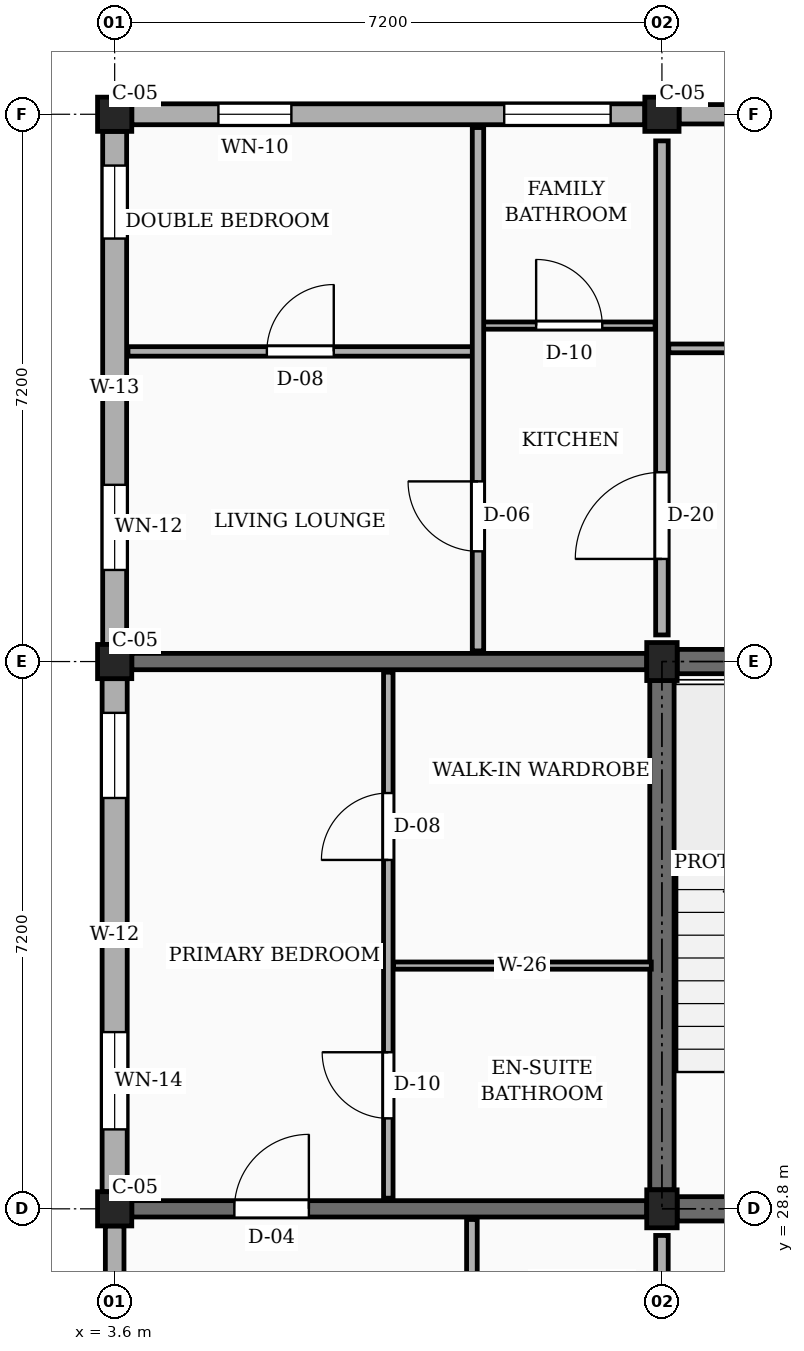
"""IFC4 building model, lengths in metres.
Left out: names, types, materials, properties, quantities, classifications, styles, units other than length and angle.
Written with IfcOpenShell. Run it as: python <this file> out.ifc"""

import sys

from ifc_helpers import new_model, si_unit, direction, frame, frame_2d, origin, origin_2d, place, context, subcontext, project, spatial, rectangle, extrude, element, fill, save


model = new_model("IFC4")
c1 = context("Model", 3, precision=1e-05, world=origin(), true_north=direction((0.0, 1.0)))
c2 = subcontext(c1, "Body", "Model", "MODEL_VIEW")
j1 = project(units=[si_unit("LENGTHUNIT", "METRE"), si_unit("PLANEANGLEUNIT", "RADIAN")], contexts=[c1])
p1 = place(None, origin())
s1 = spatial("IfcSite", under=j1, at=p1, CompositionType="ELEMENT")
p2 = place(p1, origin())
s2 = spatial("IfcBuilding", under=s1, at=p2, CompositionType="ELEMENT")
p3 = place(p2, frame((0.0, 0.0, 36.0)))
s3 = spatial("IfcBuildingStorey", under=s2, at=p3, CompositionType="ELEMENT", Elevation=36.0)
for number, where, z_axis, x_axis in (
    (1, (3.6, 28.8, 0.0), (0.0, 0.0, 1.0), (1.0, 0.0, 0.0)),
    (2, (3.6, 36.0, 0.0), (0.0, 0.0, 1.0), (1.0, 0.0, 0.0)),
    (3, (3.6, 43.2, 0.0), (0.0, 0.0, 1.0), (1.0, 0.0, 0.0)),
):
    element("IfcColumn", number, at=place(p3, frame(where, z_axis=z_axis, x_axis=x_axis)), inside=s3, PredefinedType="COLUMN", context=c2, shape_type="SweptSolid", body=[
        extrude(rectangle(XDim=0.45, YDim=0.45, at=origin_2d()), origin(), (0.0, 0.0, 1.0), 3.15),
    ])
for number, where, z_axis, x_axis in (
    (4, (10.8, 28.8, 0.0), (0.0, 0.0, 1.0), (1.0, 0.0, 0.0)),
    (5, (10.8, 36.0, 0.0), (0.0, 0.0, 1.0), (1.0, 0.0, 0.0)),
):
    element("IfcColumn", number, at=place(p3, frame(where, z_axis=z_axis, x_axis=x_axis)), inside=s3, PredefinedType="COLUMN", context=c2, shape_type="SweptSolid", body=[
        extrude(rectangle(XDim=0.4, YDim=0.5, at=origin_2d()), origin(), (0.0, 0.0, 1.0), 3.15),
    ])
p4 = place(p3, frame((10.8, 43.2, 0.0), z_axis=(0.0, 0.0, 1.0), x_axis=(1.0, 0.0, 0.0)))
e6 = element("IfcColumn", 6, at=p4, inside=s3, PredefinedType="COLUMN", context=c2, shape_type="SweptSolid", body=[
    extrude(rectangle(XDim=0.45, YDim=0.45, at=origin_2d()), origin(), (0.0, 0.0, 1.0), 3.15),
])
p5 = place(p3, frame((3.825, 28.8, 0.0), z_axis=(0.0, 0.0, 1.0), x_axis=(1.0, 0.0, 0.0)))
e7 = element("IfcWall", 7, at=p5, inside=s3, PredefinedType="SOLIDWALL", context=c2, shape_type="SweptSolid", body=[
    extrude(rectangle(XDim=6.775, YDim=0.215, at=frame_2d((3.388, 0.0))), origin(), (0.0, 0.0, 1.0), 2.17),
])
p6 = place(p5, frame((1.35, 0.0, 0.0)))
e8 = element("IfcOpeningElement", 8, at=p6, cuts=e7, PredefinedType="OPENING", context=c2, shape_type="SweptSolid", body=[
    extrude(rectangle(XDim=0.98, YDim=2.12, at=frame_2d((0.49, 1.06))), frame((0.0, 0.118, 0.0), z_axis=(0.0, -1.0, 0.0), x_axis=(1.0, 0.0, 0.0)), (0.0, 0.0, 1.0), 0.235),
])
p7 = place(p3, frame((3.825, 36.0, 0.0), z_axis=(0.0, 0.0, 1.0), x_axis=(1.0, 0.0, 0.0)))
e9 = element("IfcWall", 9, at=p7, inside=s3, PredefinedType="SOLIDWALL", context=c2, shape_type="SweptSolid", body=[
    extrude(rectangle(XDim=6.775, YDim=0.215, at=frame_2d((3.388, 0.0))), origin(), (0.0, 0.0, 1.0), 2.17),
])
p8 = place(p3, frame((17.775, 43.2, 0.0), z_axis=(0.0, 0.0, 1.0), x_axis=(-1.0, 0.0, 0.0)))
e10 = element("IfcWall", 10, at=p8, inside=s3, PredefinedType="SOLIDWALL", context=c2, shape_type="SweptSolid", body=[
    extrude(rectangle(XDim=6.75, YDim=0.255, at=frame_2d((3.375, 0.0))), origin(), (0.0, 0.0, 1.0), 2.44),
])
p9 = place(p8, frame((0.45, 0.0, 0.78)))
e11 = element("IfcOpeningElement", 11, at=p9, cuts=e10, PredefinedType="OPENING", context=c2, shape_type="SweptSolid", body=[
    extrude(rectangle(XDim=1.24, YDim=1.15, at=frame_2d((0.62, 0.575))), frame((0.0, 0.137, 0.0), z_axis=(0.0, -1.0, 0.0), x_axis=(1.0, 0.0, 0.0)), (0.0, 0.0, 1.0), 0.275),
])
p10 = place(p8, frame((4.65, 0.0, 0.78)))
e12 = element("IfcOpeningElement", 12, at=p10, cuts=e10, PredefinedType="OPENING", context=c2, shape_type="SweptSolid", body=[
    extrude(rectangle(XDim=1.4, YDim=1.15, at=frame_2d((0.7, 0.575))), frame((0.0, 0.137, 0.0), z_axis=(0.0, -1.0, 0.0), x_axis=(1.0, 0.0, 0.0)), (0.0, 0.0, 1.0), 0.275),
])
p11 = place(p3, frame((10.575, 43.2, 0.0), z_axis=(0.0, 0.0, 1.0), x_axis=(-1.0, 0.0, 0.0)))
e13 = element("IfcWall", 13, at=p11, inside=s3, PredefinedType="SOLIDWALL", context=c2, shape_type="SweptSolid", body=[
    extrude(rectangle(XDim=6.75, YDim=0.275, at=frame_2d((3.375, 0.0))), origin(), (0.0, 0.0, 1.0), 2.44),
])
p12 = place(p11, frame((0.45, 0.0, 0.78)))
e14 = element("IfcOpeningElement", 14, at=p12, cuts=e13, PredefinedType="OPENING", context=c2, shape_type="SweptSolid", body=[
    extrude(rectangle(XDim=1.4, YDim=1.15, at=frame_2d((0.7, 0.575))), frame((0.0, 0.147, 0.0), z_axis=(0.0, -1.0, 0.0), x_axis=(1.0, 0.0, 0.0)), (0.0, 0.0, 1.0), 0.295),
])
p13 = place(p11, frame((4.65, 0.0, 0.78)))
e15 = element("IfcOpeningElement", 15, at=p13, cuts=e13, PredefinedType="OPENING", context=c2, shape_type="SweptSolid", body=[
    extrude(rectangle(XDim=0.96, YDim=1.26, at=frame_2d((0.48, 0.63))), frame((0.0, 0.147, 0.0), z_axis=(0.0, -1.0, 0.0), x_axis=(1.0, 0.0, 0.0)), (0.0, 0.0, 1.0), 0.295),
])
p14 = place(p3, frame((3.6, 42.975, 0.0), z_axis=(0.0, 0.0, 1.0), x_axis=(0.0, -1.0, 0.0)))
e16 = element("IfcWall", 16, at=p14, inside=s3, PredefinedType="SOLIDWALL", context=c2, shape_type="SweptSolid", body=[
    extrude(rectangle(XDim=6.75, YDim=0.315, at=frame_2d((3.375, 0.0))), origin(), (0.0, 0.0, 1.0), 2.44),
])
p15 = place(p14, frame((0.45, 0.0, 0.78)))
e17 = element("IfcOpeningElement", 17, at=p15, cuts=e16, PredefinedType="OPENING", context=c2, shape_type="SweptSolid", body=[
    extrude(rectangle(XDim=0.96, YDim=1.26, at=frame_2d((0.48, 0.63))), frame((0.0, 0.167, 0.0), z_axis=(0.0, -1.0, 0.0), x_axis=(1.0, 0.0, 0.0)), (0.0, 0.0, 1.0), 0.335),
])
p16 = place(p14, frame((4.65, 0.0, 0.78)))
e18 = element("IfcOpeningElement", 18, at=p16, cuts=e16, PredefinedType="OPENING", context=c2, shape_type="SweptSolid", body=[
    extrude(rectangle(XDim=1.12, YDim=1.26, at=frame_2d((0.56, 0.63))), frame((0.0, 0.167, 0.0), z_axis=(0.0, -1.0, 0.0), x_axis=(1.0, 0.0, 0.0)), (0.0, 0.0, 1.0), 0.335),
])
p17 = place(p3, frame((3.6, 35.775, 0.0), z_axis=(0.0, 0.0, 1.0), x_axis=(0.0, -1.0, 0.0)))
e19 = element("IfcWall", 19, at=p17, inside=s3, PredefinedType="SOLIDWALL", context=c2, shape_type="SweptSolid", body=[
    extrude(rectangle(XDim=6.75, YDim=0.33, at=frame_2d((3.375, 0.0))), origin(), (0.0, 0.0, 1.0), 2.44),
])
p18 = place(p17, frame((0.45, 0.0, 0.78)))
e20 = element("IfcOpeningElement", 20, at=p18, cuts=e19, PredefinedType="OPENING", context=c2, shape_type="SweptSolid", body=[
    extrude(rectangle(XDim=1.12, YDim=1.26, at=frame_2d((0.56, 0.63))), frame((0.0, 0.175, 0.0), z_axis=(0.0, -1.0, 0.0), x_axis=(1.0, 0.0, 0.0)), (0.0, 0.0, 1.0), 0.35),
])
p19 = place(p17, frame((4.65, 0.0, 0.78)))
e21 = element("IfcOpeningElement", 21, at=p19, cuts=e19, PredefinedType="OPENING", context=c2, shape_type="SweptSolid", body=[
    extrude(rectangle(XDim=1.28, YDim=1.26, at=frame_2d((0.64, 0.63))), frame((0.0, 0.175, 0.0), z_axis=(0.0, -1.0, 0.0), x_axis=(1.0, 0.0, 0.0)), (0.0, 0.0, 1.0), 0.35),
])
p20 = place(p3, frame((3.6, 28.575, 0.0), z_axis=(0.0, 0.0, 1.0), x_axis=(0.0, -1.0, 0.0)))
e22 = element("IfcWall", 22, at=p20, inside=s3, PredefinedType="SOLIDWALL", context=c2, shape_type="SweptSolid", body=[
    extrude(rectangle(XDim=3.955, YDim=0.245, at=frame_2d((1.978, 0.0))), origin(), (0.0, 0.0, 1.0), 2.44),
])
p21 = place(p20, frame((1.002, 0.0, 0.78)))
e23 = element("IfcOpeningElement", 23, at=p21, cuts=e22, PredefinedType="OPENING", context=c2, shape_type="SweptSolid", body=[
    extrude(rectangle(XDim=1.28, YDim=1.26, at=frame_2d((0.64, 0.63))), frame((0.0, 0.133, 0.0), z_axis=(0.0, -1.0, 0.0), x_axis=(1.0, 0.0, 0.0)), (0.0, 0.0, 1.0), 0.265),
])
p22 = place(p3, frame((10.8, 29.05, 0.0), z_axis=(0.0, 0.0, 1.0), x_axis=(0.0, 1.0, 0.0)))
e24 = element("IfcWall", 24, at=p22, inside=s3, PredefinedType="SHEAR", context=c2, shape_type="SweptSolid", body=[
    extrude(rectangle(XDim=6.7, YDim=0.32, at=frame_2d((3.35, 0.0))), origin(), (0.0, 0.0, 1.0), 2.87),
])
for number, where, z_axis, x_axis in (
    (25, (11.0, 36.0, 0.0), (0.0, 0.0, 1.0), (1.0, 0.0, 0.0)),
    (26, (11.0, 28.8, 0.0), (0.0, 0.0, 1.0), (1.0, 0.0, 0.0)),
):
    element("IfcWall", number, at=place(p3, frame(where, z_axis=z_axis, x_axis=x_axis)), inside=s3, PredefinedType="SHEAR", context=c2, shape_type="SweptSolid", body=[
        extrude(rectangle(XDim=6.8, YDim=0.32, at=frame_2d((3.4, 0.0))), origin(), (0.0, 0.0, 1.0), 2.87),
    ])
p23 = place(p3, frame((10.8, 21.95, 0.0), z_axis=(0.0, 0.0, 1.0), x_axis=(0.0, 1.0, 0.0)))
e27 = element("IfcWall", 27, at=p23, inside=s3, PredefinedType="PARTITIONING", context=c2, shape_type="SweptSolid", body=[
    extrude(rectangle(XDim=6.5, YDim=0.165, at=frame_2d((3.25, 0.0))), origin(), (0.0, 0.0, 1.0), 2.305),
])
p24 = place(p23, frame((1.0, 0.0, 0.0)))
e28 = element("IfcOpeningElement", 28, at=p24, cuts=e27, PredefinedType="OPENING", context=c2, shape_type="SweptSolid", body=[
    extrude(rectangle(XDim=0.94, YDim=2.12, at=frame_2d((0.47, 1.06))), frame((0.0, 0.093, 0.0), z_axis=(0.0, -1.0, 0.0), x_axis=(1.0, 0.0, 0.0)), (0.0, 0.0, 1.0), 0.185),
])
p25 = place(p3, frame((10.8, 36.35, 0.0), z_axis=(0.0, 0.0, 1.0), x_axis=(0.0, 1.0, 0.0)))
e29 = element("IfcWall", 29, at=p25, inside=s3, PredefinedType="PARTITIONING", context=c2, shape_type="SweptSolid", body=[
    extrude(rectangle(XDim=6.5, YDim=0.165, at=frame_2d((3.25, 0.0))), origin(), (0.0, 0.0, 1.0), 2.305),
])
p26 = place(p25, frame((1.0, 0.0, 0.0)))
e30 = element("IfcOpeningElement", 30, at=p26, cuts=e29, PredefinedType="OPENING", context=c2, shape_type="SweptSolid", body=[
    extrude(rectangle(XDim=1.14, YDim=2.18, at=frame_2d((0.57, 1.09))), frame((0.0, 0.093, 0.0), z_axis=(0.0, -1.0, 0.0), x_axis=(1.0, 0.0, 0.0)), (0.0, 0.0, 1.0), 0.185),
])
p27 = place(p3, frame((8.3, 21.74, 0.0), z_axis=(0.0, 0.0, 1.0), x_axis=(0.0, 1.0, 0.0)))
e31 = element("IfcWall", 31, at=p27, inside=s3, PredefinedType="PARTITIONING", context=c2, shape_type="SweptSolid", body=[
    extrude(rectangle(XDim=6.92, YDim=0.14, at=frame_2d((3.46, 0.0))), origin(), (0.0, 0.0, 1.0), 2.305),
])
p28 = place(p27, frame((1.31, 0.0, 0.0)))
e32 = element("IfcOpeningElement", 32, at=p28, cuts=e31, PredefinedType="OPENING", context=c2, shape_type="SweptSolid", body=[
    extrude(rectangle(XDim=0.95, YDim=2.1, at=frame_2d((0.475, 1.05))), frame((0.0, 0.08, 0.0), z_axis=(0.0, -1.0, 0.0), x_axis=(1.0, 0.0, 0.0)), (0.0, 0.0, 1.0), 0.16),
])
p29 = place(p3, frame((7.2, 28.94, 0.0), z_axis=(0.0, 0.0, 1.0), x_axis=(0.0, 1.0, 0.0)))
e33 = element("IfcWall", 33, at=p29, inside=s3, PredefinedType="PARTITIONING", context=c2, shape_type="SweptSolid", body=[
    extrude(rectangle(XDim=6.92, YDim=0.125, at=frame_2d((3.46, 0.0))), origin(), (0.0, 0.0, 1.0), 2.305),
])
p30 = place(p29, frame((1.05, 0.0, 0.0)))
e34 = element("IfcOpeningElement", 34, at=p30, cuts=e33, PredefinedType="OPENING", context=c2, shape_type="SweptSolid", body=[
    extrude(rectangle(XDim=0.87, YDim=2.05, at=frame_2d((0.435, 1.025))), frame((0.0, 0.073, 0.0), z_axis=(0.0, -1.0, 0.0), x_axis=(1.0, 0.0, 0.0)), (0.0, 0.0, 1.0), 0.145),
])
p31 = place(p29, frame((4.45, 0.0, 0.0)))
e35 = element("IfcOpeningElement", 35, at=p31, cuts=e33, PredefinedType="OPENING", context=c2, shape_type="SweptSolid", body=[
    extrude(rectangle(XDim=0.88, YDim=2.08, at=frame_2d((0.44, 1.04))), frame((0.0, 0.073, 0.0), z_axis=(0.0, -1.0, 0.0), x_axis=(1.0, 0.0, 0.0)), (0.0, 0.0, 1.0), 0.145),
])
p32 = place(p3, frame((7.27, 32.0, 0.0), z_axis=(0.0, 0.0, 1.0), x_axis=(1.0, 0.0, 0.0)))
e36 = element("IfcWall", 36, at=p32, inside=s3, PredefinedType="PARTITIONING", context=c2, shape_type="SweptSolid", body=[
    extrude(rectangle(XDim=3.39, YDim=0.095, at=frame_2d((1.695, 0.0))), origin(), (0.0, 0.0, 1.0), 2.305),
])
p33 = place(p3, frame((10.89, 40.12, 0.0), z_axis=(0.0, 0.0, 1.0), x_axis=(1.0, 0.0, 0.0)))
e37 = element("IfcWall", 37, at=p33, inside=s3, PredefinedType="PARTITIONING", context=c2, shape_type="SweptSolid", body=[
    extrude(rectangle(XDim=7.02, YDim=0.115, at=frame_2d((3.51, 0.0))), origin(), (0.0, 0.0, 1.0), 2.305),
])
p34 = place(p33, frame((2.85, 0.0, 0.0)))
e38 = element("IfcOpeningElement", 38, at=p34, cuts=e37, PredefinedType="OPENING", context=c2, shape_type="SweptSolid", body=[
    extrude(rectangle(XDim=1.02, YDim=2.15, at=frame_2d((0.51, 1.075))), frame((0.0, 0.067, 0.0), z_axis=(0.0, -1.0, 0.0), x_axis=(1.0, 0.0, 0.0)), (0.0, 0.0, 1.0), 0.135),
])
p35 = place(p3, frame((3.775, 40.08, 0.0), z_axis=(0.0, 0.0, 1.0), x_axis=(1.0, 0.0, 0.0)))
e39 = element("IfcWall", 39, at=p35, inside=s3, PredefinedType="PARTITIONING", context=c2, shape_type="SweptSolid", body=[
    extrude(rectangle(XDim=4.535, YDim=0.125, at=frame_2d((2.268, 0.0))), origin(), (0.0, 0.0, 1.0), 2.305),
])
p36 = place(p35, frame((1.827, 0.0, 0.0)))
e40 = element("IfcOpeningElement", 40, at=p36, cuts=e39, PredefinedType="OPENING", context=c2, shape_type="SweptSolid", body=[
    extrude(rectangle(XDim=0.88, YDim=2.08, at=frame_2d((0.44, 1.04))), frame((0.0, 0.073, 0.0), z_axis=(0.0, -1.0, 0.0), x_axis=(1.0, 0.0, 0.0)), (0.0, 0.0, 1.0), 0.145),
])
p37 = place(p3, frame((8.45, 40.42, 0.0), z_axis=(0.0, 0.0, 1.0), x_axis=(1.0, 0.0, 0.0)))
e41 = element("IfcWall", 41, at=p37, inside=s3, PredefinedType="PARTITIONING", context=c2, shape_type="SweptSolid", body=[
    extrude(rectangle(XDim=2.26, YDim=0.095, at=frame_2d((1.13, 0.0))), origin(), (0.0, 0.0, 1.0), 2.305),
])
p38 = place(p37, frame((0.695, 0.0, 0.0)))
e42 = element("IfcOpeningElement", 42, at=p38, cuts=e41, PredefinedType="OPENING", context=c2, shape_type="SweptSolid", body=[
    extrude(rectangle(XDim=0.87, YDim=2.05, at=frame_2d((0.435, 1.025))), frame((0.0, 0.058, 0.0), z_axis=(0.0, -1.0, 0.0), x_axis=(1.0, 0.0, 0.0)), (0.0, 0.0, 1.0), 0.115),
])
p39 = place(p3, frame((8.38, 36.14, 0.0), z_axis=(0.0, 0.0, 1.0), x_axis=(0.0, 1.0, 0.0)))
e43 = element("IfcWall", 43, at=p39, inside=s3, PredefinedType="PARTITIONING", context=c2, shape_type="SweptSolid", body=[
    extrude(rectangle(XDim=6.885, YDim=0.15, at=frame_2d((3.442, 0.0))), origin(), (0.0, 0.0, 1.0), 2.305),
])
p40 = place(p39, frame((1.31, 0.0, 0.0)))
e44 = element("IfcOpeningElement", 44, at=p40, cuts=e43, PredefinedType="OPENING", context=c2, shape_type="SweptSolid", body=[
    extrude(rectangle(XDim=0.92, YDim=2.1, at=frame_2d((0.46, 1.05))), frame((0.0, 0.085, 0.0), z_axis=(0.0, -1.0, 0.0), x_axis=(1.0, 0.0, 0.0)), (0.0, 0.0, 1.0), 0.17),
])
p41 = place(p12, origin())
e45 = element("IfcWindow", 45, at=p41, inside=s3, PartitioningType="SINGLE_PANEL", PredefinedType="WINDOW", context=c2, shape_type="SweptSolid", body=[
    extrude(rectangle(XDim=1.4, YDim=1.15, at=frame_2d((0.7, 0.575))), frame((0.0, 0.03, 0.0), z_axis=(0.0, -1.0, 0.0), x_axis=(1.0, 0.0, 0.0)), (0.0, 0.0, 1.0), 0.06),
])
fill(e14, e45)
p42 = place(p13, origin())
e46 = element("IfcWindow", 46, at=p42, inside=s3, PartitioningType="SINGLE_PANEL", PredefinedType="WINDOW", context=c2, shape_type="SweptSolid", body=[
    extrude(rectangle(XDim=0.96, YDim=1.26, at=frame_2d((0.48, 0.63))), frame((0.0, 0.03, 0.0), z_axis=(0.0, -1.0, 0.0), x_axis=(1.0, 0.0, 0.0)), (0.0, 0.0, 1.0), 0.06),
])
fill(e15, e46)
p43 = place(p15, origin())
e47 = element("IfcWindow", 47, at=p43, inside=s3, PartitioningType="SINGLE_PANEL", PredefinedType="WINDOW", context=c2, shape_type="SweptSolid", body=[
    extrude(rectangle(XDim=0.96, YDim=1.26, at=frame_2d((0.48, 0.63))), frame((0.0, 0.03, 0.0), z_axis=(0.0, -1.0, 0.0), x_axis=(1.0, 0.0, 0.0)), (0.0, 0.0, 1.0), 0.06),
])
fill(e17, e47)
p44 = place(p16, origin())
e48 = element("IfcWindow", 48, at=p44, inside=s3, PartitioningType="SINGLE_PANEL", PredefinedType="WINDOW", context=c2, shape_type="SweptSolid", body=[
    extrude(rectangle(XDim=1.12, YDim=1.26, at=frame_2d((0.56, 0.63))), frame((0.0, 0.03, 0.0), z_axis=(0.0, -1.0, 0.0), x_axis=(1.0, 0.0, 0.0)), (0.0, 0.0, 1.0), 0.06),
])
fill(e18, e48)
p45 = place(p18, origin())
e49 = element("IfcWindow", 49, at=p45, inside=s3, PartitioningType="SINGLE_PANEL", PredefinedType="WINDOW", context=c2, shape_type="SweptSolid", body=[
    extrude(rectangle(XDim=1.12, YDim=1.26, at=frame_2d((0.56, 0.63))), frame((0.0, 0.03, 0.0), z_axis=(0.0, -1.0, 0.0), x_axis=(1.0, 0.0, 0.0)), (0.0, 0.0, 1.0), 0.06),
])
fill(e20, e49)
p46 = place(p19, origin())
e50 = element("IfcWindow", 50, at=p46, inside=s3, PartitioningType="SINGLE_PANEL", PredefinedType="WINDOW", context=c2, shape_type="SweptSolid", body=[
    extrude(rectangle(XDim=1.28, YDim=1.26, at=frame_2d((0.64, 0.63))), frame((0.0, 0.03, 0.0), z_axis=(0.0, -1.0, 0.0), x_axis=(1.0, 0.0, 0.0)), (0.0, 0.0, 1.0), 0.06),
])
fill(e21, e50)
p47 = place(p26, origin())
e51 = element("IfcDoor", 51, at=p47, inside=s3, OperationType="SINGLE_SWING_LEFT", PredefinedType="DOOR", context=c2, shape_type="SweptSolid", body=[
    extrude(rectangle(XDim=1.14, YDim=2.18, at=frame_2d((0.57, 1.09))), frame((0.0, 0.025, 0.0), z_axis=(0.0, -1.0, 0.0), x_axis=(1.0, 0.0, 0.0)), (0.0, 0.0, 1.0), 0.05),
])
fill(e30, e51)
p48 = place(p30, origin())
e52 = element("IfcDoor", 52, at=p48, inside=s3, OperationType="SINGLE_SWING_RIGHT", PredefinedType="DOOR", context=c2, shape_type="SweptSolid", body=[
    extrude(rectangle(XDim=0.87, YDim=2.05, at=frame_2d((0.435, 1.025))), frame((0.0, 0.025, 0.0), z_axis=(0.0, -1.0, 0.0), x_axis=(1.0, 0.0, 0.0)), (0.0, 0.0, 1.0), 0.05),
])
fill(e34, e52)
p49 = place(p31, origin())
e53 = element("IfcDoor", 53, at=p49, inside=s3, OperationType="SINGLE_SWING_LEFT", PredefinedType="DOOR", context=c2, shape_type="SweptSolid", body=[
    extrude(rectangle(XDim=0.88, YDim=2.08, at=frame_2d((0.44, 1.04))), frame((0.0, 0.025, 0.0), z_axis=(0.0, -1.0, 0.0), x_axis=(1.0, 0.0, 0.0)), (0.0, 0.0, 1.0), 0.05),
])
fill(e35, e53)
p50 = place(p36, origin())
e54 = element("IfcDoor", 54, at=p50, inside=s3, OperationType="SINGLE_SWING_RIGHT", PredefinedType="DOOR", context=c2, shape_type="SweptSolid", body=[
    extrude(rectangle(XDim=0.88, YDim=2.08, at=frame_2d((0.44, 1.04))), frame((0.0, 0.025, 0.0), z_axis=(0.0, -1.0, 0.0), x_axis=(1.0, 0.0, 0.0)), (0.0, 0.0, 1.0), 0.05),
])
fill(e40, e54)
p51 = place(p38, origin())
e55 = element("IfcDoor", 55, at=p51, inside=s3, OperationType="SINGLE_SWING_LEFT", PredefinedType="DOOR", context=c2, shape_type="SweptSolid", body=[
    extrude(rectangle(XDim=0.87, YDim=2.05, at=frame_2d((0.435, 1.025))), frame((0.0, 0.025, 0.0), z_axis=(0.0, -1.0, 0.0), x_axis=(1.0, 0.0, 0.0)), (0.0, 0.0, 1.0), 0.05),
])
fill(e42, e55)
p52 = place(p40, origin())
e56 = element("IfcDoor", 56, at=p52, inside=s3, OperationType="SINGLE_SWING_RIGHT", PredefinedType="DOOR", context=c2, shape_type="SweptSolid", body=[
    extrude(rectangle(XDim=0.92, YDim=2.1, at=frame_2d((0.46, 1.05))), frame((0.0, 0.025, 0.0), z_axis=(0.0, -1.0, 0.0), x_axis=(1.0, 0.0, 0.0)), (0.0, 0.0, 1.0), 0.05),
])
fill(e44, e56)
p53 = place(p6, origin())
e57 = element("IfcDoor", 57, at=p53, inside=s3, OperationType="SINGLE_SWING_RIGHT", PredefinedType="DOOR", context=c2, shape_type="SweptSolid", body=[
    extrude(rectangle(XDim=0.98, YDim=2.12, at=frame_2d((0.49, 1.06))), frame((0.0, 0.025, 0.0), z_axis=(0.0, -1.0, 0.0), x_axis=(1.0, 0.0, 0.0)), (0.0, 0.0, 1.0), 0.05),
])
fill(e8, e57)
save(model, sys.argv[1])
